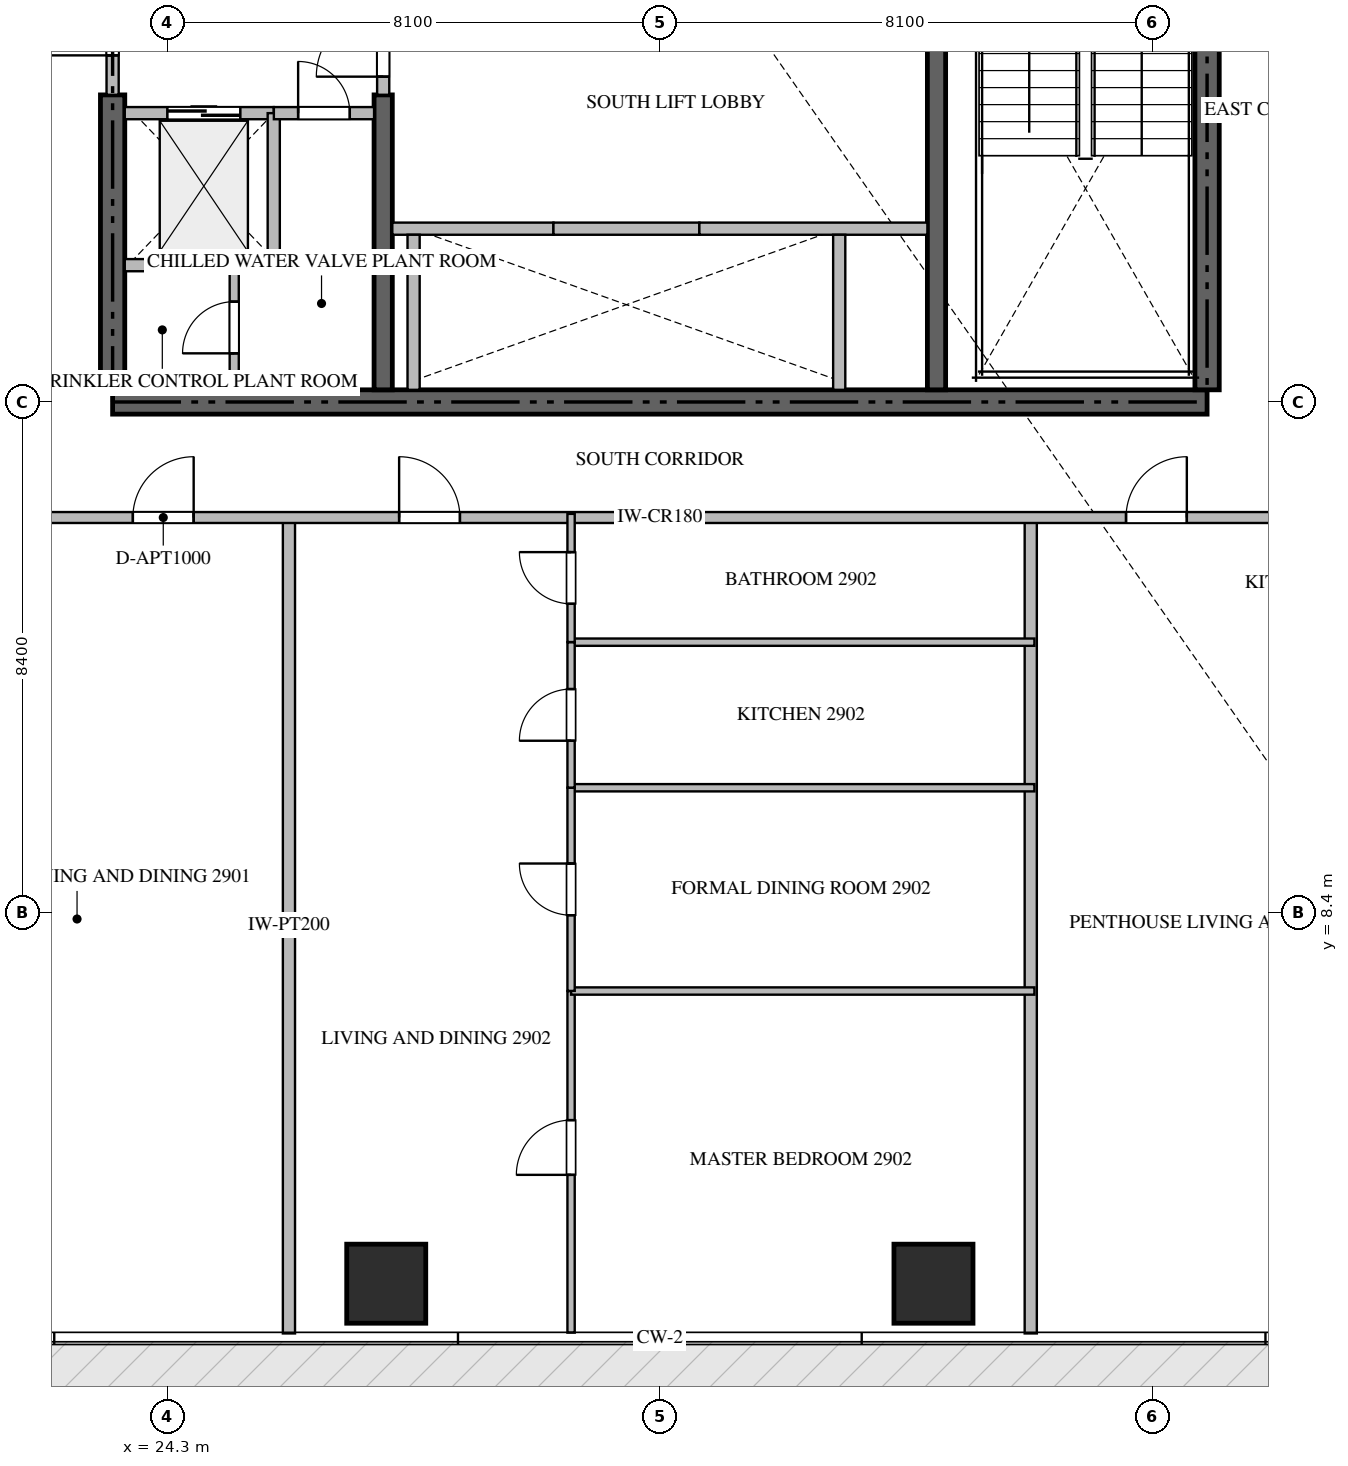
"""IFC4 building model, lengths in metres.
Left out: names, types, materials, properties, quantities, classifications, styles, units other than length and angle.
Written with IfcOpenShell. Run it as: python <this file> out.ifc"""

import sys

from ifc_helpers import new_model, si_unit, direction, frame, frame_2d, origin, origin_2d, place, context, subcontext, project, spatial, rectangle, extrude, source, transform, mapped, element, fill, save


model = new_model("IFC4")
c1 = context("Model", 3, precision=1e-05, world=origin(), true_north=direction((0.0, 1.0)))
c2 = subcontext(c1, "Body", "Model", "MODEL_VIEW")
j1 = project(units=[si_unit("LENGTHUNIT", "METRE"), si_unit("PLANEANGLEUNIT", "RADIAN")], contexts=[c1])
p1 = place(None, origin())
s1 = spatial("IfcSite", under=j1, at=p1, CompositionType="ELEMENT")
p2 = place(p1, origin())
s2 = spatial("IfcBuilding", under=s1, at=p2, CompositionType="ELEMENT")
p3 = place(p2, frame((0.0, 0.0, 120.15)))
s3 = spatial("IfcBuildingStorey", under=s2, at=p3, CompositionType="ELEMENT", Elevation=120.15)
p4 = place(p3, frame((23.4, 16.8, -0.44), z_axis=(0.0, 0.0, 1.0), x_axis=(1.0, 0.0, 0.0)))
e1 = element("IfcWall", 1, at=p4, inside=s3, PredefinedType="SHEAR", context=c2, shape_type="SweptSolid", body=[
    extrude(rectangle(XDim=18.0, YDim=0.4, at=frame_2d((9.0, 0.0))), origin(), (0.0, 0.0, 1.0), 3.928),
])
p5 = place(p3, frame((23.4, 17.0, -0.44), z_axis=(0.0, 0.0, 1.0), x_axis=(0.0, 1.0, 0.0)))
e2 = element("IfcWall", 2, at=p5, inside=s3, PredefinedType="SHEAR", context=c2, shape_type="SweptSolid", body=[
    extrude(rectangle(XDim=4.85, YDim=0.4, at=frame_2d((2.425, 0.0))), origin(), (0.0, 0.0, 1.0), 3.928),
])
p6 = place(p3, frame((41.4, 17.0, -0.44), z_axis=(0.0, 0.0, 1.0), x_axis=(0.0, 1.0, 0.0)))
e3 = element("IfcWall", 3, at=p6, inside=s3, PredefinedType="SHEAR", context=c2, shape_type="SweptSolid", body=[
    extrude(rectangle(XDim=8.35, YDim=0.4, at=frame_2d((4.175, 0.0))), origin(), (0.0, 0.0, 1.0), 3.928),
])
p7 = place(p3, frame((27.85, 17.0, -0.44), z_axis=(0.0, 0.0, 1.0), x_axis=(0.0, 1.0, 0.0)))
e4 = element("IfcWall", 4, at=p7, inside=s3, PredefinedType="SHEAR", context=c2, shape_type="SweptSolid", body=[
    extrude(rectangle(XDim=4.85, YDim=0.3, at=frame_2d((2.425, 0.0))), origin(), (0.0, 0.0, 1.0), 3.928),
])
p8 = place(p3, frame((36.95, 17.0, -0.44), z_axis=(0.0, 0.0, 1.0), x_axis=(0.0, 1.0, 0.0)))
e5 = element("IfcWall", 5, at=p8, inside=s3, PredefinedType="SHEAR", context=c2, shape_type="SweptSolid", body=[
    extrude(rectangle(XDim=8.35, YDim=0.3, at=frame_2d((4.175, 0.0))), origin(), (0.0, 0.0, 1.0), 3.928),
])
m1 = source(origin(), c2, "Body", "SweptSolid", [
    extrude(rectangle(XDim=1.3, YDim=1.3, at=origin_2d()), origin(), (0.0, 0.0, 1.0), 3.93),
])
for number, where, z_axis, x_axis in (
    (6, (27.9, 2.3, -0.44), (0.0, 0.0, 1.0), (1.0, 0.0, 0.0)),
    (7, (36.9, 2.3, -0.44), (0.0, 0.0, 1.0), (1.0, 0.0, 0.0)),
):
    element("IfcColumn", number, at=place(p3, frame(where, z_axis=z_axis, x_axis=x_axis)), inside=s3, PredefinedType="COLUMN", context=c2, shape_type="MappedRepresentation", body=[
        mapped(m1, transform((0.0, 0.0, 0.0), scale=1.0)),
    ])
p9 = place(p3, frame((23.6, 21.55, 0.0), z_axis=(0.0, 0.0, 1.0), x_axis=(1.0, 0.0, 0.0)))
e8 = element("IfcWall", 8, at=p9, inside=s3, PredefinedType="STANDARD", context=c2, shape_type="SweptSolid", body=[
    extrude(rectangle(XDim=2.45, YDim=0.2, at=frame_2d((1.225, 0.0))), origin(), (0.0, 0.0, 1.0), 3.49),
])
p10 = place(p9, frame((0.7, 0.0, 0.0)))
e9 = element("IfcOpeningElement", 9, at=p10, cuts=e8, PredefinedType="OPENING", context=c2, shape_type="SweptSolid", body=[
    extrude(rectangle(XDim=1.2, YDim=2.2, at=frame_2d((0.6, 1.1))), frame((0.0, 0.11, 0.0), z_axis=(0.0, -1.0, 0.0), x_axis=(1.0, 0.0, 0.0)), (0.0, 0.0, 1.0), 0.22),
])
p11 = place(p3, frame((28.0, 19.65, 0.0), z_axis=(0.0, 0.0, 1.0), x_axis=(1.0, 0.0, 0.0)))
e10 = element("IfcWall", 10, at=p11, inside=s3, PredefinedType="STANDARD", context=c2, shape_type="SweptSolid", body=[
    extrude(rectangle(XDim=2.65, YDim=0.2, at=frame_2d((1.325, 0.0))), origin(), (0.0, 0.0, 1.0), 3.49),
])
p12 = place(p3, frame((28.35, 17.0, 0.0), z_axis=(0.0, 0.0, 1.0), x_axis=(0.0, 1.0, 0.0)))
e11 = element("IfcWall", 11, at=p12, inside=s3, PredefinedType="STANDARD", context=c2, shape_type="SweptSolid", body=[
    extrude(rectangle(XDim=2.55, YDim=0.2, at=frame_2d((1.275, 0.0))), origin(), (0.0, 0.0, 1.0), 3.49),
])
p13 = place(p3, frame((30.65, 19.65, 0.0), z_axis=(0.0, 0.0, 1.0), x_axis=(1.0, 0.0, 0.0)))
e12 = element("IfcWall", 12, at=p13, inside=s3, PredefinedType="STANDARD", context=c2, shape_type="SweptSolid", body=[
    extrude(rectangle(XDim=2.4, YDim=0.2, at=frame_2d((1.2, 0.0))), origin(), (0.0, 0.0, 1.0), 3.49),
])
p14 = place(p3, frame((33.05, 19.65, 0.0), z_axis=(0.0, 0.0, 1.0), x_axis=(1.0, 0.0, 0.0)))
e13 = element("IfcWall", 13, at=p14, inside=s3, PredefinedType="STANDARD", context=c2, shape_type="SweptSolid", body=[
    extrude(rectangle(XDim=3.75, YDim=0.2, at=frame_2d((1.875, 0.0))), origin(), (0.0, 0.0, 1.0), 3.49),
])
p15 = place(p3, frame((35.35, 17.0, 0.0), z_axis=(0.0, 0.0, 1.0), x_axis=(0.0, 1.0, 0.0)))
e14 = element("IfcWall", 14, at=p15, inside=s3, PredefinedType="STANDARD", context=c2, shape_type="SweptSolid", body=[
    extrude(rectangle(XDim=2.55, YDim=0.2, at=frame_2d((1.275, 0.0))), origin(), (0.0, 0.0, 1.0), 3.49),
])
p16 = place(p3, frame((26.05, 19.05, 0.0), z_axis=(0.0, 0.0, 1.0), x_axis=(0.0, 1.0, 0.0)))
e15 = element("IfcWall", 15, at=p16, inside=s3, PredefinedType="STANDARD", context=c2, shape_type="SweptSolid", body=[
    extrude(rectangle(XDim=2.5, YDim=0.2, at=frame_2d((1.25, 0.0))), origin(), (0.0, 0.0, 1.0), 3.49),
])
p17 = place(p3, frame((23.6, 19.05, 0.0), z_axis=(0.0, 0.0, 1.0), x_axis=(1.0, 0.0, 0.0)))
e16 = element("IfcWall", 16, at=p17, inside=s3, PredefinedType="STANDARD", context=c2, shape_type="SweptSolid", body=[
    extrude(rectangle(XDim=2.45, YDim=0.2, at=frame_2d((1.225, 0.0))), origin(), (0.0, 0.0, 1.0), 3.49),
])
p18 = place(p3, frame((26.052, 21.55, 0.0), z_axis=(0.0, 0.0, 1.0), x_axis=(1.0, 0.0, 0.0)))
e17 = element("IfcWall", 17, at=p18, inside=s3, PredefinedType="STANDARD", context=c2, shape_type="SweptSolid", body=[
    extrude(rectangle(XDim=1.648, YDim=0.2, at=frame_2d((0.824, 0.0))), origin(), (0.0, 0.0, 1.0), 3.49),
])
p19 = place(p18, frame((0.399, 0.0, 0.0)))
e18 = element("IfcOpeningElement", 18, at=p19, cuts=e17, PredefinedType="OPENING", context=c2, shape_type="SweptSolid", body=[
    extrude(rectangle(XDim=0.85, YDim=2.1, at=frame_2d((0.425, 1.05))), frame((0.0, 0.11, 0.0), z_axis=(0.0, -1.0, 0.0), x_axis=(1.0, 0.0, 0.0)), (0.0, 0.0, 1.0), 0.22),
])
p20 = place(p3, frame((23.4, 21.852, 0.0), z_axis=(0.0, 0.0, 1.0), x_axis=(0.0, 1.0, 0.0)))
e19 = element("IfcWall", 19, at=p20, inside=s3, PredefinedType="STANDARD", context=c2, shape_type="SweptSolid", body=[
    extrude(rectangle(XDim=2.396, YDim=0.2, at=frame_2d((1.198, 0.0))), origin(), (0.0, 0.0, 1.0), 3.49),
])
p21 = place(p20, frame((0.648, 0.0, 0.0)))
e20 = element("IfcOpeningElement", 20, at=p21, cuts=e19, PredefinedType="OPENING", context=c2, shape_type="SweptSolid", body=[
    extrude(rectangle(XDim=1.1, YDim=2.15, at=frame_2d((0.55, 1.075))), frame((0.0, 0.11, 0.0), z_axis=(0.0, -1.0, 0.0), x_axis=(1.0, 0.0, 0.0)), (0.0, 0.0, 1.0), 0.22),
])
p22 = place(p3, frame((27.85, 21.852, 0.0), z_axis=(0.0, 0.0, 1.0), x_axis=(0.0, 1.0, 0.0)))
e21 = element("IfcWall", 21, at=p22, inside=s3, PredefinedType="STANDARD", context=c2, shape_type="SweptSolid", body=[
    extrude(rectangle(XDim=1.696, YDim=0.2, at=frame_2d((0.848, 0.0))), origin(), (0.0, 0.0, 1.0), 3.49),
])
p23 = place(p22, frame((0.298, 0.0, 0.0)))
e22 = element("IfcOpeningElement", 22, at=p23, cuts=e21, PredefinedType="OPENING", context=c2, shape_type="SweptSolid", body=[
    extrude(rectangle(XDim=1.1, YDim=2.15, at=frame_2d((0.55, 1.075))), frame((0.0, 0.11, 0.0), z_axis=(0.0, -1.0, 0.0), x_axis=(1.0, 0.0, 0.0)), (0.0, 0.0, 1.0), 0.22),
])
p24 = place(p3, frame((25.4, 17.0, 0.0), z_axis=(0.0, 0.0, 1.0), x_axis=(0.0, 1.0, 0.0)))
e23 = element("IfcWall", 23, at=p24, inside=s3, PredefinedType="PARTITIONING", context=c2, shape_type="SweptSolid", body=[
    extrude(rectangle(XDim=2.05, YDim=0.15, at=frame_2d((1.025, 0.0))), origin(), (0.0, 0.0, 1.0), 3.49),
])
p25 = place(p24, frame((0.6, 0.0, 0.0)))
e24 = element("IfcOpeningElement", 24, at=p25, cuts=e23, PredefinedType="OPENING", context=c2, shape_type="SweptSolid", body=[
    extrude(rectangle(XDim=0.85, YDim=2.1, at=frame_2d((0.425, 1.05))), frame((0.0, 0.085, 0.0), z_axis=(0.0, -1.0, 0.0), x_axis=(1.0, 0.0, 0.0)), (0.0, 0.0, 1.0), 0.17),
])
for number, where, z_axis, x_axis in (
    (25, (26.3, 1.482, 0.0), (0.0, 0.0, 1.0), (0.0, 1.0, 0.0)),
    (26, (38.5, 1.482, 0.0), (0.0, 0.0, 1.0), (0.0, 1.0, 0.0)),
):
    element("IfcWall", number, at=place(p3, frame(where, z_axis=z_axis, x_axis=x_axis)), inside=s3, PredefinedType="PARTITIONING", context=c2, shape_type="SweptSolid", body=[
        extrude(rectangle(XDim=13.418, YDim=0.2, at=frame_2d((6.709, 0.0))), origin(), (0.0, 0.0, 1.0), 3.49),
    ])
p26 = place(p3, frame((20.952, 14.9, 0.0), z_axis=(0.0, 0.0, 1.0), x_axis=(1.0, 0.0, 0.0)))
e27 = element("IfcWall", 27, at=p26, inside=s3, PredefinedType="PARTITIONING", context=c2, shape_type="SweptSolid", body=[
    extrude(rectangle(XDim=22.896, YDim=0.18, at=frame_2d((11.448, 0.0))), origin(), (0.0, 0.0, 1.0), 3.49),
])
p27 = place(p26, frame((2.781, 0.0, 0.0)))
e28 = element("IfcOpeningElement", 28, at=p27, cuts=e27, PredefinedType="OPENING", context=c2, shape_type="SweptSolid", body=[
    extrude(rectangle(XDim=1.0, YDim=2.15, at=frame_2d((0.5, 1.075))), frame((0.0, 0.1, 0.0), z_axis=(0.0, -1.0, 0.0), x_axis=(1.0, 0.0, 0.0)), (0.0, 0.0, 1.0), 0.2),
])
p28 = place(p26, frame((7.16, 0.0, 0.0)))
e29 = element("IfcOpeningElement", 29, at=p28, cuts=e27, PredefinedType="OPENING", context=c2, shape_type="SweptSolid", body=[
    extrude(rectangle(XDim=1.0, YDim=2.15, at=frame_2d((0.5, 1.075))), frame((0.0, 0.1, 0.0), z_axis=(0.0, -1.0, 0.0), x_axis=(1.0, 0.0, 0.0)), (0.0, 0.0, 1.0), 0.2),
])
p29 = place(p26, frame((19.115, 0.0, 0.0)))
e30 = element("IfcOpeningElement", 30, at=p29, cuts=e27, PredefinedType="OPENING", context=c2, shape_type="SweptSolid", body=[
    extrude(rectangle(XDim=1.0, YDim=2.15, at=frame_2d((0.5, 1.075))), frame((0.0, 0.1, 0.0), z_axis=(0.0, -1.0, 0.0), x_axis=(1.0, 0.0, 0.0)), (0.0, 0.0, 1.0), 0.2),
])
p30 = place(p3, frame((30.94, 1.495, 0.0), z_axis=(0.0, 0.0, 1.0), x_axis=(0.0, 1.0, 0.0)))
e31 = element("IfcWall", 31, at=p30, inside=s3, PredefinedType="PARTITIONING", context=c2, shape_type="SweptSolid", body=[
    extrude(rectangle(XDim=5.618, YDim=0.12, at=frame_2d((2.809, 0.0))), origin(), (0.0, 0.0, 1.0), 3.49),
])
p31 = place(p30, frame((2.595, 0.0, 0.0)))
e32 = element("IfcOpeningElement", 32, at=p31, cuts=e31, PredefinedType="OPENING", context=c2, shape_type="SweptSolid", body=[
    extrude(rectangle(XDim=0.9, YDim=2.1, at=frame_2d((0.45, 1.05))), frame((0.0, 0.07, 0.0), z_axis=(0.0, -1.0, 0.0), x_axis=(1.0, 0.0, 0.0)), (0.0, 0.0, 1.0), 0.14),
])
p32 = place(p3, frame((30.94, 7.113, 0.0), z_axis=(0.0, 0.0, 1.0), x_axis=(1.0, 0.0, 0.0)))
e33 = element("IfcWall", 33, at=p32, inside=s3, PredefinedType="PARTITIONING", context=c2, shape_type="SweptSolid", body=[
    extrude(rectangle(XDim=7.62, YDim=0.12, at=frame_2d((3.81, 0.0))), origin(), (0.0, 0.0, 1.0), 3.49),
])
p33 = place(p3, frame((30.94, 10.456, 0.0), z_axis=(0.0, 0.0, 1.0), x_axis=(1.0, 0.0, 0.0)))
e34 = element("IfcWall", 34, at=p33, inside=s3, PredefinedType="PARTITIONING", context=c2, shape_type="SweptSolid", body=[
    extrude(rectangle(XDim=7.62, YDim=0.12, at=frame_2d((3.81, 0.0))), origin(), (0.0, 0.0, 1.0), 2.972),
])
p34 = place(p3, frame((30.94, 12.85, 0.0), z_axis=(0.0, 0.0, 1.0), x_axis=(1.0, 0.0, 0.0)))
e35 = element("IfcWall", 35, at=p34, inside=s3, PredefinedType="PARTITIONING", context=c2, shape_type="SweptSolid", body=[
    extrude(rectangle(XDim=7.62, YDim=0.12, at=frame_2d((3.81, 0.0))), origin(), (0.0, 0.0, 1.0), 3.49),
])
p35 = place(p3, frame((30.94, 7.115, 0.0), z_axis=(0.0, 0.0, 1.0), x_axis=(0.0, 1.0, 0.0)))
e36 = element("IfcWall", 36, at=p35, inside=s3, PredefinedType="PARTITIONING", context=c2, shape_type="SweptSolid", body=[
    extrude(rectangle(XDim=3.341, YDim=0.12, at=frame_2d((1.67, 0.0))), origin(), (0.0, 0.0, 1.0), 3.49),
])
p36 = place(p35, frame((1.245, 0.0, 0.0)))
e37 = element("IfcOpeningElement", 37, at=p36, cuts=e36, PredefinedType="OPENING", context=c2, shape_type="SweptSolid", body=[
    extrude(rectangle(XDim=0.85, YDim=2.1, at=frame_2d((0.425, 1.05))), frame((0.0, 0.07, 0.0), z_axis=(0.0, -1.0, 0.0), x_axis=(1.0, 0.0, 0.0)), (0.0, 0.0, 1.0), 0.14),
])
p37 = place(p3, frame((30.94, 10.458, 0.0), z_axis=(0.0, 0.0, 1.0), x_axis=(0.0, 1.0, 0.0)))
e38 = element("IfcWall", 38, at=p37, inside=s3, PredefinedType="PARTITIONING", context=c2, shape_type="SweptSolid", body=[
    extrude(rectangle(XDim=2.392, YDim=0.12, at=frame_2d((1.196, 0.0))), origin(), (0.0, 0.0, 1.0), 3.49),
])
p38 = place(p37, frame((0.771, 0.0, 0.0)))
e39 = element("IfcOpeningElement", 39, at=p38, cuts=e38, PredefinedType="OPENING", context=c2, shape_type="SweptSolid", body=[
    extrude(rectangle(XDim=0.85, YDim=2.1, at=frame_2d((0.425, 1.05))), frame((0.0, 0.07, 0.0), z_axis=(0.0, -1.0, 0.0), x_axis=(1.0, 0.0, 0.0)), (0.0, 0.0, 1.0), 0.14),
])
p39 = place(p3, frame((30.94, 12.852, 0.0), z_axis=(0.0, 0.0, 1.0), x_axis=(0.0, 1.0, 0.0)))
e40 = element("IfcWall", 40, at=p39, inside=s3, PredefinedType="PARTITIONING", context=c2, shape_type="SweptSolid", body=[
    extrude(rectangle(XDim=2.108, YDim=0.12, at=frame_2d((1.054, 0.0))), origin(), (0.0, 0.0, 1.0), 3.49),
])
p40 = place(p39, frame((0.629, 0.0, 0.0)))
e41 = element("IfcOpeningElement", 41, at=p40, cuts=e40, PredefinedType="OPENING", context=c2, shape_type="SweptSolid", body=[
    extrude(rectangle(XDim=0.85, YDim=2.1, at=frame_2d((0.425, 1.05))), frame((0.0, 0.07, 0.0), z_axis=(0.0, -1.0, 0.0), x_axis=(1.0, 0.0, 0.0)), (0.0, 0.0, 1.0), 0.14),
])
m2 = source(origin(), c2, "Body", "SweptSolid", [
    extrude(rectangle(XDim=1.2, YDim=2.2, at=frame_2d((0.6, 1.1))), frame((0.0, 0.025, 0.0), z_axis=(0.0, -1.0, 0.0), x_axis=(1.0, 0.0, 0.0)), (0.0, 0.0, 1.0), 0.05),
])
p41 = place(p10, origin())
e42 = element("IfcDoor", 42, at=p41, inside=s3, OperationType="DOUBLE_DOOR_SLIDING", PredefinedType="DOOR", context=c2, shape_type="MappedRepresentation", body=[
    mapped(m2, transform((0.0, 0.0, 0.0), scale=1.0)),
])
fill(e9, e42)
m3 = source(origin(), c2, "Body", "SweptSolid", [
    extrude(rectangle(XDim=0.85, YDim=2.1, at=frame_2d((0.425, 1.05))), frame((0.0, 0.025, 0.0), z_axis=(0.0, -1.0, 0.0), x_axis=(1.0, 0.0, 0.0)), (0.0, 0.0, 1.0), 0.05),
])
p42 = place(p19, origin())
e43 = element("IfcDoor", 43, at=p42, inside=s3, OperationType="SINGLE_SWING_LEFT", PredefinedType="DOOR", context=c2, shape_type="MappedRepresentation", body=[
    mapped(m3, transform((0.0, 0.0, 0.0), scale=1.0)),
])
fill(e18, e43)
m4 = source(origin(), c2, "Body", "SweptSolid", [
    extrude(rectangle(XDim=1.1, YDim=2.15, at=frame_2d((0.55, 1.075))), frame((0.0, 0.025, 0.0), z_axis=(0.0, -1.0, 0.0), x_axis=(1.0, 0.0, 0.0)), (0.0, 0.0, 1.0), 0.05),
])
p43 = place(p21, origin())
e44 = element("IfcDoor", 44, at=p43, inside=s3, OperationType="SINGLE_SWING_LEFT", PredefinedType="DOOR", context=c2, shape_type="MappedRepresentation", body=[
    mapped(m4, transform((0.0, 0.0, 0.0), scale=1.0)),
])
fill(e20, e44)
p44 = place(p23, origin())
e45 = element("IfcDoor", 45, at=p44, inside=s3, OperationType="SINGLE_SWING_LEFT", PredefinedType="DOOR", context=c2, shape_type="MappedRepresentation", body=[
    mapped(m4, transform((0.0, 0.0, 0.0), scale=1.0)),
])
fill(e22, e45)
p45 = place(p25, origin())
e46 = element("IfcDoor", 46, at=p45, inside=s3, OperationType="SINGLE_SWING_LEFT", PredefinedType="DOOR", context=c2, shape_type="MappedRepresentation", body=[
    mapped(m3, transform((0.0, 0.0, 0.0), scale=1.0)),
])
fill(e24, e46)
m5 = source(origin(), c2, "Body", "SweptSolid", [
    extrude(rectangle(XDim=1.0, YDim=2.15, at=frame_2d((0.5, 1.075))), frame((0.0, 0.025, 0.0), z_axis=(0.0, -1.0, 0.0), x_axis=(1.0, 0.0, 0.0)), (0.0, 0.0, 1.0), 0.05),
])
p46 = place(p27, origin())
e47 = element("IfcDoor", 47, at=p46, inside=s3, OperationType="SINGLE_SWING_RIGHT", PredefinedType="DOOR", context=c2, shape_type="MappedRepresentation", body=[
    mapped(m5, transform((0.0, 0.0, 0.0), scale=1.0)),
])
fill(e28, e47)
p47 = place(p28, origin())
e48 = element("IfcDoor", 48, at=p47, inside=s3, OperationType="SINGLE_SWING_LEFT", PredefinedType="DOOR", context=c2, shape_type="MappedRepresentation", body=[
    mapped(m5, transform((0.0, 0.0, 0.0), scale=1.0)),
])
fill(e29, e48)
p48 = place(p29, origin())
e49 = element("IfcDoor", 49, at=p48, inside=s3, OperationType="SINGLE_SWING_RIGHT", PredefinedType="DOOR", context=c2, shape_type="MappedRepresentation", body=[
    mapped(m5, transform((0.0, 0.0, 0.0), scale=1.0)),
])
fill(e30, e49)
m6 = source(origin(), c2, "Body", "SweptSolid", [
    extrude(rectangle(XDim=0.9, YDim=2.1, at=frame_2d((0.45, 1.05))), frame((0.0, 0.025, 0.0), z_axis=(0.0, -1.0, 0.0), x_axis=(1.0, 0.0, 0.0)), (0.0, 0.0, 1.0), 0.05),
])
p49 = place(p31, origin())
e50 = element("IfcDoor", 50, at=p49, inside=s3, OperationType="SINGLE_SWING_LEFT", PredefinedType="DOOR", context=c2, shape_type="MappedRepresentation", body=[
    mapped(m6, transform((0.0, 0.0, 0.0), scale=1.0)),
])
fill(e32, e50)
p50 = place(p36, origin())
e51 = element("IfcDoor", 51, at=p50, inside=s3, OperationType="SINGLE_SWING_RIGHT", PredefinedType="DOOR", context=c2, shape_type="MappedRepresentation", body=[
    mapped(m3, transform((0.0, 0.0, 0.0), scale=1.0)),
])
fill(e37, e51)
p51 = place(p38, origin())
e52 = element("IfcDoor", 52, at=p51, inside=s3, OperationType="SINGLE_SWING_LEFT", PredefinedType="DOOR", context=c2, shape_type="MappedRepresentation", body=[
    mapped(m3, transform((0.0, 0.0, 0.0), scale=1.0)),
])
fill(e39, e52)
p52 = place(p40, origin())
e53 = element("IfcDoor", 53, at=p52, inside=s3, OperationType="SINGLE_SWING_RIGHT", PredefinedType="DOOR", context=c2, shape_type="MappedRepresentation", body=[
    mapped(m3, transform((0.0, 0.0, 0.0), scale=1.0)),
])
fill(e41, e53)
save(model, sys.argv[1])
